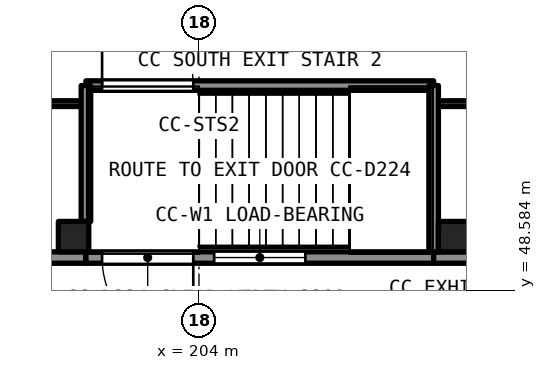
"""IFC4 building model, lengths in metres.
Left out: names, types, materials, properties, quantities, classifications, styles, units other than length and angle.
Written with IfcOpenShell. Run it as: python <this file> out.ifc"""

import sys

from ifc_helpers import new_model, si_unit, direction, frame, frame_2d, origin, origin_2d, place, context, subcontext, project, spatial, rectangle, extrude, element, fill, save


model = new_model("IFC4")
c1 = context("Model", 3, precision=1e-05, world=origin(), true_north=direction((0.0, 1.0)))
c2 = subcontext(c1, "Body", "Model", "MODEL_VIEW")
j1 = project(units=[si_unit("LENGTHUNIT", "METRE"), si_unit("PLANEANGLEUNIT", "RADIAN")], contexts=[c1])
p1 = place(None, origin())
s1 = spatial("IfcSite", under=j1, at=p1, CompositionType="ELEMENT")
p2 = place(p1, origin())
s2 = spatial("IfcBuilding", under=s1, at=p2, CompositionType="ELEMENT")
p3 = place(p2, origin())
s3 = spatial("IfcBuildingStorey", under=s2, at=p3, CompositionType="ELEMENT", Elevation=0.0)
for number, where, z_axis, x_axis in (
    (1, (200.7, 50.0, -1.2), (0.0, 0.0, 1.0), (1.0, 0.0, 0.0)),
    (2, (210.7, 50.0, -1.2), (0.0, 0.0, 1.0), (1.0, 0.0, 0.0)),
):
    element("IfcColumn", number, at=place(p3, frame(where, z_axis=z_axis, x_axis=x_axis)), inside=s3, PredefinedType="COLUMN", context=c2, shape_type="SweptSolid", body=[
        extrude(rectangle(XDim=0.8, YDim=0.8, at=origin_2d()), origin(), (0.0, 0.0, 1.0), 10.2),
    ])
p4 = place(p3, frame((201.025, 49.45, 0.0), z_axis=(0.0, 0.0, 1.0), x_axis=(-1.0, 0.0, 0.0)))
e3 = element("IfcWall", 3, at=p4, inside=s3, PredefinedType="SOLIDWALL", context=c2, shape_type="SweptSolid", body=[
    extrude(rectangle(XDim=30.85, YDim=0.3, at=frame_2d((15.425, 0.0))), origin(), (0.0, 0.0, 1.0), 8.59),
])
p5 = place(p4, frame((4.475, 0.0, 0.0)))
e4 = element("IfcOpeningElement", 4, at=p5, cuts=e3, PredefinedType="OPENING", context=c2, shape_type="SweptSolid", body=[
    extrude(rectangle(XDim=1.8, YDim=2.1, at=frame_2d((0.9, 1.05))), frame((0.0, 0.161, 0.0), z_axis=(0.0, -1.0, 0.0), x_axis=(1.0, 0.0, 0.0)), (0.0, 0.0, 1.0), 0.321),
])
p6 = place(p4, frame((25.725, 0.0, 0.9)))
e5 = element("IfcOpeningElement", 5, at=p6, cuts=e3, PredefinedType="OPENING", context=c2, shape_type="SweptSolid", body=[
    extrude(rectangle(XDim=2.4, YDim=1.8, at=frame_2d((1.2, 0.9))), frame((0.0, 0.161, 0.0), z_axis=(0.0, -1.0, 0.0), x_axis=(1.0, 0.0, 0.0)), (0.0, 0.0, 1.0), 0.321),
])
p7 = place(p4, frame((13.475, 0.0, 0.9)))
e6 = element("IfcOpeningElement", 6, at=p7, cuts=e3, PredefinedType="OPENING", context=c2, shape_type="SweptSolid", body=[
    extrude(rectangle(XDim=2.4, YDim=1.8, at=frame_2d((1.2, 0.9))), frame((0.0, 0.161, 0.0), z_axis=(0.0, -1.0, 0.0), x_axis=(1.0, 0.0, 0.0)), (0.0, 0.0, 1.0), 0.321),
])
p8 = place(p3, frame((210.175, 49.45, 0.0), z_axis=(0.0, 0.0, 1.0), x_axis=(-1.0, 0.0, 0.0)))
e7 = element("IfcWall", 7, at=p8, inside=s3, PredefinedType="SOLIDWALL", context=c2, shape_type="SweptSolid", body=[
    extrude(rectangle(XDim=9.15, YDim=0.3, at=frame_2d((4.575, 0.0))), origin(), (0.0, 0.0, 1.0), 8.59),
])
p9 = place(p8, frame((6.325, 0.0, 0.0)))
e8 = element("IfcOpeningElement", 8, at=p9, cuts=e7, PredefinedType="OPENING", context=c2, shape_type="SweptSolid", body=[
    extrude(rectangle(XDim=2.4, YDim=2.1, at=frame_2d((1.2, 1.05))), frame((0.0, 0.161, 0.0), z_axis=(0.0, -1.0, 0.0), x_axis=(1.0, 0.0, 0.0)), (0.0, 0.0, 1.0), 0.321),
])
p10 = place(p8, frame((3.375, 0.0, 0.9)))
e9 = element("IfcOpeningElement", 9, at=p10, cuts=e7, PredefinedType="OPENING", context=c2, shape_type="SweptSolid", body=[
    extrude(rectangle(XDim=2.4, YDim=1.8, at=frame_2d((1.2, 0.9))), frame((0.0, 0.161, 0.0), z_axis=(0.0, -1.0, 0.0), x_axis=(1.0, 0.0, 0.0)), (0.0, 0.0, 1.0), 0.321),
])
p11 = place(p3, frame((221.275, 49.45, 0.0), z_axis=(0.0, 0.0, 1.0), x_axis=(-1.0, 0.0, 0.0)))
e10 = element("IfcWall", 10, at=p11, inside=s3, PredefinedType="SOLIDWALL", context=c2, shape_type="SweptSolid", body=[
    extrude(rectangle(XDim=11.1, YDim=0.3, at=frame_2d((5.55, 0.0))), origin(), (0.0, 0.0, 1.0), 8.59),
])
p12 = place(p11, frame((4.725, 0.0, 0.0)))
e11 = element("IfcOpeningElement", 11, at=p12, cuts=e10, PredefinedType="OPENING", context=c2, shape_type="SweptSolid", body=[
    extrude(rectangle(XDim=1.8, YDim=2.1, at=frame_2d((0.9, 1.05))), frame((0.0, 0.161, 0.0), z_axis=(0.0, -1.0, 0.0), x_axis=(1.0, 0.0, 0.0)), (0.0, 0.0, 1.0), 0.321),
])
p13 = place(p3, frame((170.175, 53.5, 0.0), z_axis=(0.0, 0.0, 1.0), x_axis=(1.0, 0.0, 0.0)))
e12 = element("IfcWall", 12, at=p13, inside=s3, PredefinedType="PARTITIONING", context=c2, shape_type="SweptSolid", body=[
    extrude(rectangle(XDim=30.85, YDim=0.15, at=frame_2d((15.425, 0.0))), origin(), (0.0, 0.0, 1.0), 8.59),
])
p14 = place(p13, frame((11.975, 0.0, 0.0)))
e13 = element("IfcOpeningElement", 13, at=p14, cuts=e12, PredefinedType="OPENING", context=c2, shape_type="SweptSolid", body=[
    extrude(rectangle(XDim=0.9, YDim=2.1, at=frame_2d((0.45, 1.05))), frame((0.0, 0.085, 0.0), z_axis=(0.0, -1.0, 0.0), x_axis=(1.0, 0.0, 0.0)), (0.0, 0.0, 1.0), 0.171),
])
p15 = place(p13, frame((28.475, 0.0, 0.0)))
e14 = element("IfcOpeningElement", 14, at=p15, cuts=e12, PredefinedType="OPENING", context=c2, shape_type="SweptSolid", body=[
    extrude(rectangle(XDim=1.0, YDim=2.1, at=frame_2d((0.5, 1.05))), frame((0.0, 0.085, 0.0), z_axis=(0.0, -1.0, 0.0), x_axis=(1.0, 0.0, 0.0)), (0.0, 0.0, 1.0), 0.171),
])
p16 = place(p13, frame((16.975, 0.0, 0.0)))
e15 = element("IfcOpeningElement", 15, at=p16, cuts=e12, PredefinedType="OPENING", context=c2, shape_type="SweptSolid", body=[
    extrude(rectangle(XDim=1.0, YDim=2.1, at=frame_2d((0.5, 1.05))), frame((0.0, 0.085, 0.0), z_axis=(0.0, -1.0, 0.0), x_axis=(1.0, 0.0, 0.0)), (0.0, 0.0, 1.0), 0.171),
])
p17 = place(p13, frame((24.725, 0.0, 0.0)))
e16 = element("IfcOpeningElement", 16, at=p17, cuts=e12, PredefinedType="OPENING", context=c2, shape_type="SweptSolid", body=[
    extrude(rectangle(XDim=1.8, YDim=2.1, at=frame_2d((0.9, 1.05))), frame((0.0, 0.085, 0.0), z_axis=(0.0, -1.0, 0.0), x_axis=(1.0, 0.0, 0.0)), (0.0, 0.0, 1.0), 0.171),
])
p18 = place(p13, frame((7.475, 0.0, 0.0)))
e17 = element("IfcOpeningElement", 17, at=p18, cuts=e12, PredefinedType="OPENING", context=c2, shape_type="SweptSolid", body=[
    extrude(rectangle(XDim=0.9, YDim=2.1, at=frame_2d((0.45, 1.05))), frame((0.0, 0.085, 0.0), z_axis=(0.0, -1.0, 0.0), x_axis=(1.0, 0.0, 0.0)), (0.0, 0.0, 1.0), 0.171),
])
p19 = place(p13, frame((21.725, 0.0, 0.0)))
e18 = element("IfcOpeningElement", 18, at=p19, cuts=e12, PredefinedType="OPENING", context=c2, shape_type="SweptSolid", body=[
    extrude(rectangle(XDim=1.0, YDim=2.1, at=frame_2d((0.5, 1.05))), frame((0.0, 0.085, 0.0), z_axis=(0.0, -1.0, 0.0), x_axis=(1.0, 0.0, 0.0)), (0.0, 0.0, 1.0), 0.171),
])
p20 = place(p13, frame((2.2, 0.0, 0.0)))
e19 = element("IfcOpeningElement", 19, at=p20, cuts=e12, PredefinedType="OPENING", context=c2, shape_type="SweptSolid", body=[
    extrude(rectangle(XDim=0.9, YDim=2.1, at=frame_2d((0.45, 1.05))), frame((0.0, 0.085, 0.0), z_axis=(0.0, -1.0, 0.0), x_axis=(1.0, 0.0, 0.0)), (0.0, 0.0, 1.0), 0.171),
])
p21 = place(p3, frame((210.175, 53.5, 0.0), z_axis=(0.0, 0.0, 1.0), x_axis=(1.0, 0.0, 0.0)))
e20 = element("IfcWall", 20, at=p21, inside=s3, PredefinedType="PARTITIONING", context=c2, shape_type="SweptSolid", body=[
    extrude(rectangle(XDim=11.1, YDim=0.15, at=frame_2d((5.55, 0.0))), origin(), (0.0, 0.0, 1.0), 8.59),
])
p22 = place(p21, frame((8.475, 0.0, 0.0)))
e21 = element("IfcOpeningElement", 21, at=p22, cuts=e20, PredefinedType="OPENING", context=c2, shape_type="SweptSolid", body=[
    extrude(rectangle(XDim=1.0, YDim=2.1, at=frame_2d((0.5, 1.05))), frame((0.0, 0.085, 0.0), z_axis=(0.0, -1.0, 0.0), x_axis=(1.0, 0.0, 0.0)), (0.0, 0.0, 1.0), 0.171),
])
p23 = place(p21, frame((1.45, 0.0, 0.0)))
e22 = element("IfcOpeningElement", 22, at=p23, cuts=e20, PredefinedType="OPENING", context=c2, shape_type="SweptSolid", body=[
    extrude(rectangle(XDim=1.0, YDim=2.1, at=frame_2d((0.5, 1.05))), frame((0.0, 0.085, 0.0), z_axis=(0.0, -1.0, 0.0), x_axis=(1.0, 0.0, 0.0)), (0.0, 0.0, 1.0), 0.171),
])
p24 = place(p21, frame((4.725, 0.0, 0.0)))
e23 = element("IfcOpeningElement", 23, at=p24, cuts=e20, PredefinedType="OPENING", context=c2, shape_type="SweptSolid", body=[
    extrude(rectangle(XDim=1.8, YDim=2.1, at=frame_2d((0.9, 1.05))), frame((0.0, 0.085, 0.0), z_axis=(0.0, -1.0, 0.0), x_axis=(1.0, 0.0, 0.0)), (0.0, 0.0, 1.0), 0.171),
])
p25 = place(p3, frame((201.025, 53.975, 0.0), z_axis=(0.0, 0.0, 1.0), x_axis=(1.0, 0.0, 0.0)))
e24 = element("IfcWall", 24, at=p25, inside=s3, PredefinedType="SHEAR", context=c2, shape_type="SweptSolid", body=[
    extrude(rectangle(XDim=9.15, YDim=0.25, at=frame_2d((4.575, 0.0))), origin(), (0.0, 0.0, 1.0), 8.59),
])
p26 = place(p25, frame((0.425, 0.0, 0.0)))
e25 = element("IfcOpeningElement", 25, at=p26, cuts=e24, PredefinedType="OPENING", context=c2, shape_type="SweptSolid", body=[
    extrude(rectangle(XDim=2.4, YDim=2.1, at=frame_2d((1.2, 1.05))), frame((0.0, 0.135, 0.0), z_axis=(0.0, -1.0, 0.0), x_axis=(1.0, 0.0, 0.0)), (0.0, 0.0, 1.0), 0.271),
])
p27 = place(p3, frame((201.025, 50.4, 0.0), z_axis=(0.0, 0.0, 1.0), x_axis=(0.0, 1.0, 0.0)))
e26 = element("IfcWall", 26, at=p27, inside=s3, PredefinedType="SHEAR", context=c2, shape_type="SweptSolid", body=[
    extrude(rectangle(XDim=3.575, YDim=0.25, at=frame_2d((1.788, 0.0))), origin(), (0.0, 0.0, 1.0), 8.59),
])
p28 = place(p3, frame((210.175, 49.6, 0.0), z_axis=(0.0, 0.0, 1.0), x_axis=(0.0, 1.0, 0.0)))
e27 = element("IfcWall", 27, at=p28, inside=s3, PredefinedType="SHEAR", context=c2, shape_type="SweptSolid", body=[
    extrude(rectangle(XDim=4.375, YDim=0.25, at=frame_2d((2.188, 0.0))), origin(), (0.0, 0.0, 1.0), 8.59),
])
p29 = place(p26, origin())
e28 = element("IfcDoor", 28, at=p29, inside=s3, OperationType="DOUBLE_DOOR_SINGLE_SWING", PredefinedType="DOOR", context=c2, shape_type="SweptSolid", body=[
    extrude(rectangle(XDim=2.4, YDim=2.1, at=frame_2d((1.2, 1.05))), frame((0.0, 0.025, 0.0), z_axis=(0.0, -1.0, 0.0), x_axis=(1.0, 0.0, 0.0)), (0.0, 0.0, 1.0), 0.05),
])
fill(e25, e28)
p30 = place(p9, origin())
e29 = element("IfcDoor", 29, at=p30, inside=s3, OperationType="DOUBLE_DOOR_SINGLE_SWING", PredefinedType="DOOR", context=c2, shape_type="SweptSolid", body=[
    extrude(rectangle(XDim=2.4, YDim=2.1, at=frame_2d((1.2, 1.05))), frame((0.0, 0.025, 0.0), z_axis=(0.0, -1.0, 0.0), x_axis=(1.0, 0.0, 0.0)), (0.0, 0.0, 1.0), 0.05),
])
fill(e8, e29)
p31 = place(p10, origin())
e30 = element("IfcWindow", 30, at=p31, inside=s3, PartitioningType="DOUBLE_PANEL_VERTICAL", PredefinedType="WINDOW", context=c2, shape_type="SweptSolid", body=[
    extrude(rectangle(XDim=2.4, YDim=1.8, at=frame_2d((1.2, 0.9))), frame((0.0, 0.03, 0.0), z_axis=(0.0, -1.0, 0.0), x_axis=(1.0, 0.0, 0.0)), (0.0, 0.0, 1.0), 0.06),
])
fill(e9, e30)
save(model, sys.argv[1])
